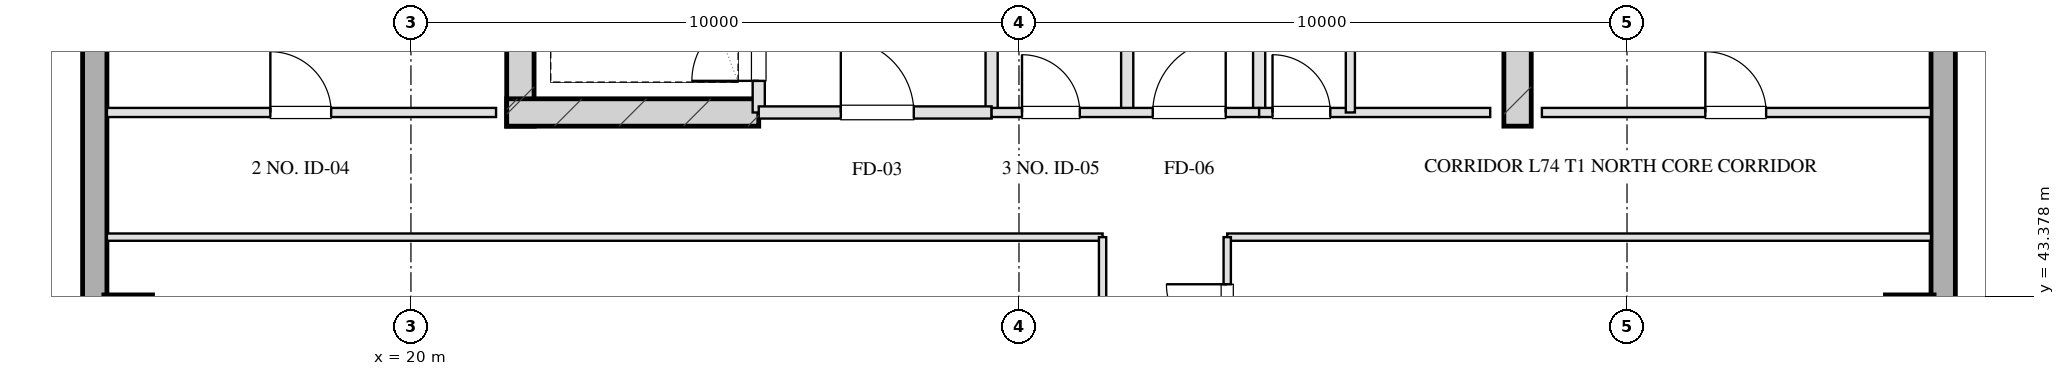
"""IFC4 building model, lengths in metres.
Left out: names, types, materials, properties, quantities, classifications, styles, units other than length and angle.
Written with IfcOpenShell. Run it as: python <this file> out.ifc"""

import sys

from ifc_helpers import new_model, si_unit, direction, frame, frame_2d, origin, origin_2d, place, context, subcontext, project, spatial, rectangle, hollow_rectangle, extrude, element, fill, save


model = new_model("IFC4")
c1 = context("Model", 3, precision=1e-05, world=origin(), true_north=direction((0.0, 1.0)))
c2 = subcontext(c1, "Body", "Model", "MODEL_VIEW")
j1 = project(units=[si_unit("LENGTHUNIT", "METRE"), si_unit("PLANEANGLEUNIT", "RADIAN")], contexts=[c1])
p1 = place(None, origin())
s1 = spatial("IfcSite", under=j1, at=p1, CompositionType="ELEMENT")
p2 = place(p1, origin())
s2 = spatial("IfcBuilding", under=s1, at=p2, CompositionType="ELEMENT")
p3 = place(p2, frame((0.0, 0.0, 269.6)))
s3 = spatial("IfcBuildingStorey", under=s2, at=p3, CompositionType="ELEMENT", Elevation=269.6)
for number, where, z_axis, x_axis in (
    (1, (21.8, 46.175, 0.0), (0.0, 0.0, 1.0), (0.0, 1.0, 0.0)),
    (2, (38.2, 46.175, 0.0), (0.0, 0.0, 1.0), (0.0, 1.0, 0.0)),
):
    element("IfcWall", number, at=place(p3, frame(where, z_axis=z_axis, x_axis=x_axis)), inside=s3, PredefinedType="SHEAR", context=c2, shape_type="SweptSolid", body=[
        extrude(rectangle(XDim=9.33, YDim=0.45, at=frame_2d((4.665, 0.0))), origin(), (0.0, 0.0, 1.0), 3.2),
    ])
p4 = place(p3, frame((21.575, 46.4, 0.0), z_axis=(0.0, 0.0, 1.0), x_axis=(1.0, 0.0, 0.0)))
e3 = element("IfcWall", 3, at=p4, inside=s3, PredefinedType="SHEAR", context=c2, shape_type="SweptSolid", body=[
    extrude(rectangle(XDim=4.145, YDim=0.45, at=frame_2d((2.073, 0.0))), origin(), (0.0, 0.0, 1.0), 3.2),
])
for number, where, z_axis, x_axis in (
    (4, (15.35, 43.0, 0.0), (0.0, 0.0, 1.0), (1.0, 0.0, 0.0)),
    (5, (44.65, 43.0, 0.0), (0.0, 0.0, 1.0), (1.0, 0.0, 0.0)),
):
    element("IfcColumn", number, at=place(p3, frame(where, z_axis=z_axis, x_axis=x_axis)), inside=s3, PredefinedType="COLUMN", context=c2, shape_type="SweptSolid", body=[
        extrude(hollow_rectangle(XDim=0.8, YDim=0.8, WallThickness=0.028, at=origin_2d()), origin(), (0.0, 0.0, 1.0), 3.201),
    ])
p5 = place(p3, frame((14.8, 13.1, 0.0), z_axis=(0.0, 0.0, 1.0), x_axis=(0.0, 1.0, 0.0)))
e6 = element("IfcWall", 6, at=p5, inside=s3, PredefinedType="SOLIDWALL", context=c2, shape_type="SweptSolid", body=[
    extrude(rectangle(XDim=41.8, YDim=0.4, at=frame_2d((20.9, 0.0))), origin(), (0.0, 0.0, 1.0), 2.36),
])
p6 = place(p5, frame((22.525, 0.0, 0.75)))
e7 = element("IfcOpeningElement", 7, at=p6, cuts=e6, PredefinedType="OPENING", context=c2, shape_type="SweptSolid", body=[
    extrude(rectangle(XDim=1.95, YDim=1.21, at=frame_2d((0.975, 0.605))), frame((0.0, 0.21, 0.0), z_axis=(0.0, -1.0, 0.0), x_axis=(1.0, 0.0, 0.0)), (0.0, 0.0, 1.0), 0.42),
])
p7 = place(p5, frame((26.325, 0.0, 0.75)))
e8 = element("IfcOpeningElement", 8, at=p7, cuts=e6, PredefinedType="OPENING", context=c2, shape_type="SweptSolid", body=[
    extrude(rectangle(XDim=1.95, YDim=1.21, at=frame_2d((0.975, 0.605))), frame((0.0, 0.21, 0.0), z_axis=(0.0, -1.0, 0.0), x_axis=(1.0, 0.0, 0.0)), (0.0, 0.0, 1.0), 0.42),
])
p8 = place(p5, frame((14.55, 0.0, 0.0)))
e9 = element("IfcOpeningElement", 9, at=p8, cuts=e6, PredefinedType="OPENING", context=c2, shape_type="SweptSolid", body=[
    extrude(rectangle(XDim=1.1, YDim=2.15, at=frame_2d((0.55, 1.075))), frame((0.0, 0.21, 0.0), z_axis=(0.0, -1.0, 0.0), x_axis=(1.0, 0.0, 0.0)), (0.0, 0.0, 1.0), 0.42),
])
p9 = place(p3, frame((45.2, 54.9, 0.0), z_axis=(0.0, 0.0, 1.0), x_axis=(0.0, -1.0, 0.0)))
e10 = element("IfcWall", 10, at=p9, inside=s3, PredefinedType="SOLIDWALL", context=c2, shape_type="SweptSolid", body=[
    extrude(rectangle(XDim=41.8, YDim=0.4, at=frame_2d((20.9, 0.0))), origin(), (0.0, 0.0, 1.0), 2.36),
])
p10 = place(p9, frame((17.325, 0.0, 0.75)))
e11 = element("IfcOpeningElement", 11, at=p10, cuts=e10, PredefinedType="OPENING", context=c2, shape_type="SweptSolid", body=[
    extrude(rectangle(XDim=1.95, YDim=1.21, at=frame_2d((0.975, 0.605))), frame((0.0, 0.21, 0.0), z_axis=(0.0, -1.0, 0.0), x_axis=(1.0, 0.0, 0.0)), (0.0, 0.0, 1.0), 0.42),
])
p11 = place(p9, frame((13.525, 0.0, 0.75)))
e12 = element("IfcOpeningElement", 12, at=p11, cuts=e10, PredefinedType="OPENING", context=c2, shape_type="SweptSolid", body=[
    extrude(rectangle(XDim=1.95, YDim=1.21, at=frame_2d((0.975, 0.605))), frame((0.0, 0.21, 0.0), z_axis=(0.0, -1.0, 0.0), x_axis=(1.0, 0.0, 0.0)), (0.0, 0.0, 1.0), 0.42),
])
p12 = place(p9, frame((23.45, 0.0, 0.0)))
e13 = element("IfcOpeningElement", 13, at=p12, cuts=e10, PredefinedType="OPENING", context=c2, shape_type="SweptSolid", body=[
    extrude(rectangle(XDim=1.1, YDim=2.15, at=frame_2d((0.55, 1.075))), frame((0.0, 0.21, 0.0), z_axis=(0.0, -1.0, 0.0), x_axis=(1.0, 0.0, 0.0)), (0.0, 0.0, 1.0), 0.42),
])
p13 = place(p3, frame((25.72, 46.4, 0.0), z_axis=(0.0, 0.0, 1.0), x_axis=(0.0, 1.0, 0.0)))
e14 = element("IfcWall", 14, at=p13, inside=s3, PredefinedType="PARTITIONING", context=c2, shape_type="SweptSolid", body=[
    extrude(rectangle(XDim=1.9, YDim=0.2, at=frame_2d((0.95, 0.0))), origin(), (0.0, 0.0, 1.0), 2.925),
])
p14 = place(p13, frame((0.52, 0.0, 0.0)))
e15 = element("IfcOpeningElement", 15, at=p14, cuts=e14, PredefinedType="OPENING", context=c2, shape_type="SweptSolid", body=[
    extrude(rectangle(XDim=1.1, YDim=2.05, at=frame_2d((0.55, 1.025))), frame((0.0, 0.11, 0.0), z_axis=(0.0, -1.0, 0.0), x_axis=(1.0, 0.0, 0.0)), (0.0, 0.0, 1.0), 0.22),
])
p15 = place(p3, frame((29.55, 46.4, 0.0), z_axis=(0.0, 0.0, 1.0), x_axis=(0.0, 1.0, 0.0)))
e16 = element("IfcWall", 16, at=p15, inside=s3, PredefinedType="PARTITIONING", context=c2, shape_type="SweptSolid", body=[
    extrude(rectangle(XDim=8.43, YDim=0.2, at=frame_2d((4.215, 0.0))), origin(), (0.0, 0.0, 1.0), 2.925),
])
p16 = place(p3, frame((25.72, 46.4, 0.0), z_axis=(0.0, 0.0, 1.0), x_axis=(1.0, 0.0, 0.0)))
e17 = element("IfcWall", 17, at=p16, inside=s3, PredefinedType="PARTITIONING", context=c2, shape_type="SweptSolid", body=[
    extrude(rectangle(XDim=3.83, YDim=0.2, at=frame_2d((1.915, 0.0))), origin(), (0.0, 0.0, 1.0), 2.925),
])
p17 = place(p16, frame((1.35, 0.0, 0.0)))
e18 = element("IfcOpeningElement", 18, at=p17, cuts=e17, PredefinedType="OPENING", context=c2, shape_type="SweptSolid", body=[
    extrude(rectangle(XDim=1.2, YDim=2.05, at=frame_2d((0.6, 1.025))), frame((0.0, 0.11, 0.0), z_axis=(0.0, -1.0, 0.0), x_axis=(1.0, 0.0, 0.0)), (0.0, 0.0, 1.0), 0.22),
])
for number, where, z_axis, x_axis in (
    (19, (33.95, 46.4, 0.0), (0.0, 0.0, 1.0), (0.0, 1.0, 0.0)),
    (20, (31.78, 46.4, 0.0), (0.0, 0.0, 1.0), (0.0, 1.0, 0.0)),
):
    element("IfcWall", number, at=place(p3, frame(where, z_axis=z_axis, x_axis=x_axis)), inside=s3, PredefinedType="PARTITIONING", context=c2, shape_type="SweptSolid", body=[
        extrude(rectangle(XDim=8.43, YDim=0.2, at=frame_2d((4.215, 0.0))), origin(), (0.0, 0.0, 1.0), 2.925),
    ])
p18 = place(p3, frame((29.55, 46.4, 0.0), z_axis=(0.0, 0.0, 1.0), x_axis=(1.0, 0.0, 0.0)))
e21 = element("IfcWall", 21, at=p18, inside=s3, PredefinedType="PARTITIONING", context=c2, shape_type="SweptSolid", body=[
    extrude(rectangle(XDim=4.4, YDim=0.15, at=frame_2d((2.2, 0.0))), origin(), (0.0, 0.0, 1.0), 2.925),
])
p19 = place(p18, frame((0.5, 0.0, 0.0)))
e22 = element("IfcOpeningElement", 22, at=p19, cuts=e21, PredefinedType="OPENING", context=c2, shape_type="SweptSolid", body=[
    extrude(rectangle(XDim=0.95, YDim=2.05, at=frame_2d((0.475, 1.025))), frame((0.0, 0.085, 0.0), z_axis=(0.0, -1.0, 0.0), x_axis=(1.0, 0.0, 0.0)), (0.0, 0.0, 1.0), 0.17),
])
p20 = place(p18, frame((2.65, 0.0, 0.0)))
e23 = element("IfcOpeningElement", 23, at=p20, cuts=e21, PredefinedType="OPENING", context=c2, shape_type="SweptSolid", body=[
    extrude(rectangle(XDim=1.2, YDim=2.05, at=frame_2d((0.6, 1.025))), frame((0.0, 0.085, 0.0), z_axis=(0.0, -1.0, 0.0), x_axis=(1.0, 0.0, 0.0)), (0.0, 0.0, 1.0), 0.17),
])
p21 = place(p3, frame((33.95, 46.4, 0.0), z_axis=(0.0, 0.0, 1.0), x_axis=(1.0, 0.0, 0.0)))
e24 = element("IfcWall", 24, at=p21, inside=s3, PredefinedType="PARTITIONING", context=c2, shape_type="SweptSolid", body=[
    extrude(rectangle(XDim=3.8, YDim=0.15, at=frame_2d((1.9, 0.0))), origin(), (0.0, 0.0, 1.0), 2.925),
])
p22 = place(p21, frame((0.22, 0.0, 0.0)))
e25 = element("IfcOpeningElement", 25, at=p22, cuts=e24, PredefinedType="OPENING", context=c2, shape_type="SweptSolid", body=[
    extrude(rectangle(XDim=0.95, YDim=2.05, at=frame_2d((0.475, 1.025))), frame((0.0, 0.085, 0.0), z_axis=(0.0, -1.0, 0.0), x_axis=(1.0, 0.0, 0.0)), (0.0, 0.0, 1.0), 0.17),
])
p23 = place(p3, frame((35.45, 46.4, 0.0), z_axis=(0.0, 0.0, 1.0), x_axis=(0.0, 1.0, 0.0)))
e26 = element("IfcWall", 26, at=p23, inside=s3, PredefinedType="PARTITIONING", context=c2, shape_type="SweptSolid", body=[
    extrude(rectangle(XDim=8.43, YDim=0.15, at=frame_2d((4.215, 0.0))), origin(), (0.0, 0.0, 1.0), 2.515),
])
p24 = place(p23, frame((2.55, 0.0, 0.0)))
e27 = element("IfcOpeningElement", 27, at=p24, cuts=e26, PredefinedType="OPENING", context=c2, shape_type="SweptSolid", body=[
    extrude(rectangle(XDim=0.95, YDim=2.05, at=frame_2d((0.475, 1.025))), frame((0.0, 0.085, 0.0), z_axis=(0.0, -1.0, 0.0), x_axis=(1.0, 0.0, 0.0)), (0.0, 0.0, 1.0), 0.17),
])
p25 = place(p23, frame((4.7, 0.0, 0.0)))
e28 = element("IfcOpeningElement", 28, at=p25, cuts=e26, PredefinedType="OPENING", context=c2, shape_type="SweptSolid", body=[
    extrude(rectangle(XDim=0.9, YDim=2.05, at=frame_2d((0.45, 1.025))), frame((0.0, 0.085, 0.0), z_axis=(0.0, -1.0, 0.0), x_axis=(1.0, 0.0, 0.0)), (0.0, 0.0, 1.0), 0.17),
])
p26 = place(p23, frame((6.8, 0.0, 0.0)))
e29 = element("IfcOpeningElement", 29, at=p26, cuts=e26, PredefinedType="OPENING", context=c2, shape_type="SweptSolid", body=[
    extrude(rectangle(XDim=0.9, YDim=2.05, at=frame_2d((0.45, 1.025))), frame((0.0, 0.085, 0.0), z_axis=(0.0, -1.0, 0.0), x_axis=(1.0, 0.0, 0.0)), (0.0, 0.0, 1.0), 0.17),
])
p27 = place(p3, frame((15.0, 46.4, 0.0), z_axis=(0.0, 0.0, 1.0), x_axis=(1.0, 0.0, 0.0)))
e30 = element("IfcWall", 30, at=p27, inside=s3, PredefinedType="PARTITIONING", context=c2, shape_type="SweptSolid", body=[
    extrude(rectangle(XDim=6.4, YDim=0.15, at=frame_2d((3.2, 0.0))), origin(), (0.0, 0.0, 1.0), 2.925),
])
p28 = place(p27, frame((2.688, 0.0, 0.0)))
e31 = element("IfcOpeningElement", 31, at=p28, cuts=e30, PredefinedType="OPENING", context=c2, shape_type="SweptSolid", body=[
    extrude(rectangle(XDim=1.0, YDim=2.05, at=frame_2d((0.5, 1.025))), frame((0.0, 0.085, 0.0), z_axis=(0.0, -1.0, 0.0), x_axis=(1.0, 0.0, 0.0)), (0.0, 0.0, 1.0), 0.17),
])
p29 = place(p3, frame((38.6, 46.4, 0.0), z_axis=(0.0, 0.0, 1.0), x_axis=(1.0, 0.0, 0.0)))
e32 = element("IfcWall", 32, at=p29, inside=s3, PredefinedType="PARTITIONING", context=c2, shape_type="SweptSolid", body=[
    extrude(rectangle(XDim=6.4, YDim=0.15, at=frame_2d((3.2, 0.0))), origin(), (0.0, 0.0, 1.0), 2.925),
])
p30 = place(p29, frame((2.688, 0.0, 0.0)))
e33 = element("IfcOpeningElement", 33, at=p30, cuts=e32, PredefinedType="OPENING", context=c2, shape_type="SweptSolid", body=[
    extrude(rectangle(XDim=1.0, YDim=2.05, at=frame_2d((0.5, 1.025))), frame((0.0, 0.085, 0.0), z_axis=(0.0, -1.0, 0.0), x_axis=(1.0, 0.0, 0.0)), (0.0, 0.0, 1.0), 0.17),
])
p31 = place(p3, frame((15.0, 44.35, 0.0), z_axis=(0.0, 0.0, 1.0), x_axis=(1.0, 0.0, 0.0)))
e34 = element("IfcWall", 34, at=p31, inside=s3, PredefinedType="PARTITIONING", context=c2, shape_type="SweptSolid", body=[
    extrude(rectangle(XDim=16.375, YDim=0.12, at=frame_2d((8.188, 0.0))), origin(), (0.0, 0.0, 1.0), 2.925),
])
p32 = place(p3, frame((33.425, 44.35, 0.0), z_axis=(0.0, 0.0, 1.0), x_axis=(1.0, 0.0, 0.0)))
e35 = element("IfcWall", 35, at=p32, inside=s3, PredefinedType="PARTITIONING", context=c2, shape_type="SweptSolid", body=[
    extrude(rectangle(XDim=11.575, YDim=0.12, at=frame_2d((5.788, 0.0))), origin(), (0.0, 0.0, 1.0), 2.925),
])
p33 = place(p3, frame((31.375, 23.65, 0.0), z_axis=(0.0, 0.0, 1.0), x_axis=(0.0, 1.0, 0.0)))
e36 = element("IfcWall", 36, at=p33, inside=s3, PredefinedType="PARTITIONING", context=c2, shape_type="SweptSolid", body=[
    extrude(rectangle(XDim=20.7, YDim=0.12, at=frame_2d((10.35, 0.0))), origin(), (0.0, 0.0, 1.0), 2.925),
])
p34 = place(p33, frame((2.675, 0.0, 0.0)))
e37 = element("IfcOpeningElement", 37, at=p34, cuts=e36, PredefinedType="OPENING", context=c2, shape_type="SweptSolid", body=[
    extrude(rectangle(XDim=1.0, YDim=2.05, at=frame_2d((0.5, 1.025))), frame((0.0, 0.07, 0.0), z_axis=(0.0, -1.0, 0.0), x_axis=(1.0, 0.0, 0.0)), (0.0, 0.0, 1.0), 0.14),
])
p35 = place(p33, frame((9.85, 0.0, 0.0)))
e38 = element("IfcOpeningElement", 38, at=p35, cuts=e36, PredefinedType="OPENING", context=c2, shape_type="SweptSolid", body=[
    extrude(rectangle(XDim=1.0, YDim=2.05, at=frame_2d((0.5, 1.025))), frame((0.0, 0.07, 0.0), z_axis=(0.0, -1.0, 0.0), x_axis=(1.0, 0.0, 0.0)), (0.0, 0.0, 1.0), 0.14),
])
p36 = place(p33, frame((17.025, 0.0, 0.0)))
e39 = element("IfcOpeningElement", 39, at=p36, cuts=e36, PredefinedType="OPENING", context=c2, shape_type="SweptSolid", body=[
    extrude(rectangle(XDim=1.0, YDim=2.05, at=frame_2d((0.5, 1.025))), frame((0.0, 0.07, 0.0), z_axis=(0.0, -1.0, 0.0), x_axis=(1.0, 0.0, 0.0)), (0.0, 0.0, 1.0), 0.14),
])
p37 = place(p3, frame((33.425, 23.65, 0.0), z_axis=(0.0, 0.0, 1.0), x_axis=(0.0, 1.0, 0.0)))
e40 = element("IfcWall", 40, at=p37, inside=s3, PredefinedType="PARTITIONING", context=c2, shape_type="SweptSolid", body=[
    extrude(rectangle(XDim=20.7, YDim=0.12, at=frame_2d((10.35, 0.0))), origin(), (0.0, 0.0, 1.0), 2.925),
])
p38 = place(p37, frame((2.175, 0.0, 0.0)))
e41 = element("IfcOpeningElement", 41, at=p38, cuts=e40, PredefinedType="OPENING", context=c2, shape_type="SweptSolid", body=[
    extrude(rectangle(XDim=1.0, YDim=2.05, at=frame_2d((0.5, 1.025))), frame((0.0, 0.07, 0.0), z_axis=(0.0, -1.0, 0.0), x_axis=(1.0, 0.0, 0.0)), (0.0, 0.0, 1.0), 0.14),
])
p39 = place(p37, frame((6.75, 0.0, 0.0)))
e42 = element("IfcOpeningElement", 42, at=p39, cuts=e40, PredefinedType="OPENING", context=c2, shape_type="SweptSolid", body=[
    extrude(rectangle(XDim=1.05, YDim=2.05, at=frame_2d((0.525, 1.025))), frame((0.0, 0.07, 0.0), z_axis=(0.0, -1.0, 0.0), x_axis=(1.0, 0.0, 0.0)), (0.0, 0.0, 1.0), 0.14),
])
p40 = place(p37, frame((11.25, 0.0, 0.0)))
e43 = element("IfcOpeningElement", 43, at=p40, cuts=e40, PredefinedType="OPENING", context=c2, shape_type="SweptSolid", body=[
    extrude(rectangle(XDim=1.0, YDim=2.05, at=frame_2d((0.5, 1.025))), frame((0.0, 0.07, 0.0), z_axis=(0.0, -1.0, 0.0), x_axis=(1.0, 0.0, 0.0)), (0.0, 0.0, 1.0), 0.14),
])
p41 = place(p37, frame((15.75, 0.0, 0.0)))
e44 = element("IfcOpeningElement", 44, at=p41, cuts=e40, PredefinedType="OPENING", context=c2, shape_type="SweptSolid", body=[
    extrude(rectangle(XDim=1.0, YDim=2.05, at=frame_2d((0.5, 1.025))), frame((0.0, 0.07, 0.0), z_axis=(0.0, -1.0, 0.0), x_axis=(1.0, 0.0, 0.0)), (0.0, 0.0, 1.0), 0.14),
])
p42 = place(p37, frame((18.925, 0.0, 0.0)))
e45 = element("IfcOpeningElement", 45, at=p42, cuts=e40, PredefinedType="OPENING", context=c2, shape_type="SweptSolid", body=[
    extrude(rectangle(XDim=1.0, YDim=2.05, at=frame_2d((0.5, 1.025))), frame((0.0, 0.07, 0.0), z_axis=(0.0, -1.0, 0.0), x_axis=(1.0, 0.0, 0.0)), (0.0, 0.0, 1.0), 0.14),
])
p43 = place(p14, origin())
e46 = element("IfcDoor", 46, at=p43, inside=s3, OperationType="SINGLE_SWING_LEFT", PredefinedType="DOOR", context=c2, shape_type="SweptSolid", body=[
    extrude(rectangle(XDim=1.1, YDim=2.05, at=frame_2d((0.55, 1.025))), frame((0.0, 0.025, 0.0), z_axis=(0.0, -1.0, 0.0), x_axis=(1.0, 0.0, 0.0)), (0.0, 0.0, 1.0), 0.05),
])
fill(e15, e46)
p44 = place(p17, origin())
e47 = element("IfcDoor", 47, at=p44, inside=s3, OperationType="SINGLE_SWING_LEFT", PredefinedType="DOOR", context=c2, shape_type="SweptSolid", body=[
    extrude(rectangle(XDim=1.2, YDim=2.05, at=frame_2d((0.6, 1.025))), frame((0.0, 0.025, 0.0), z_axis=(0.0, -1.0, 0.0), x_axis=(1.0, 0.0, 0.0)), (0.0, 0.0, 1.0), 0.05),
])
fill(e18, e47)
p45 = place(p19, origin())
e48 = element("IfcDoor", 48, at=p45, inside=s3, OperationType="SINGLE_SWING_LEFT", PredefinedType="DOOR", context=c2, shape_type="SweptSolid", body=[
    extrude(rectangle(XDim=0.95, YDim=2.05, at=frame_2d((0.475, 1.025))), frame((0.0, 0.025, 0.0), z_axis=(0.0, -1.0, 0.0), x_axis=(1.0, 0.0, 0.0)), (0.0, 0.0, 1.0), 0.05),
])
fill(e22, e48)
p46 = place(p20, origin())
e49 = element("IfcDoor", 49, at=p46, inside=s3, OperationType="SINGLE_SWING_RIGHT", PredefinedType="DOOR", context=c2, shape_type="SweptSolid", body=[
    extrude(rectangle(XDim=1.2, YDim=2.05, at=frame_2d((0.6, 1.025))), frame((0.0, 0.025, 0.0), z_axis=(0.0, -1.0, 0.0), x_axis=(1.0, 0.0, 0.0)), (0.0, 0.0, 1.0), 0.05),
])
fill(e23, e49)
p47 = place(p22, origin())
e50 = element("IfcDoor", 50, at=p47, inside=s3, OperationType="SINGLE_SWING_LEFT", PredefinedType="DOOR", context=c2, shape_type="SweptSolid", body=[
    extrude(rectangle(XDim=0.95, YDim=2.05, at=frame_2d((0.475, 1.025))), frame((0.0, 0.025, 0.0), z_axis=(0.0, -1.0, 0.0), x_axis=(1.0, 0.0, 0.0)), (0.0, 0.0, 1.0), 0.05),
])
fill(e25, e50)
p48 = place(p28, origin())
e51 = element("IfcDoor", 51, at=p48, inside=s3, OperationType="SINGLE_SWING_LEFT", PredefinedType="DOOR", context=c2, shape_type="SweptSolid", body=[
    extrude(rectangle(XDim=1.0, YDim=2.05, at=frame_2d((0.5, 1.025))), frame((0.0, 0.025, 0.0), z_axis=(0.0, -1.0, 0.0), x_axis=(1.0, 0.0, 0.0)), (0.0, 0.0, 1.0), 0.05),
])
fill(e31, e51)
p49 = place(p30, origin())
e52 = element("IfcDoor", 52, at=p49, inside=s3, OperationType="SINGLE_SWING_LEFT", PredefinedType="DOOR", context=c2, shape_type="SweptSolid", body=[
    extrude(rectangle(XDim=1.0, YDim=2.05, at=frame_2d((0.5, 1.025))), frame((0.0, 0.025, 0.0), z_axis=(0.0, -1.0, 0.0), x_axis=(1.0, 0.0, 0.0)), (0.0, 0.0, 1.0), 0.05),
])
fill(e33, e52)
p50 = place(p42, origin())
e53 = element("IfcDoor", 53, at=p50, inside=s3, OperationType="SINGLE_SWING_RIGHT", PredefinedType="DOOR", context=c2, shape_type="SweptSolid", body=[
    extrude(rectangle(XDim=1.0, YDim=2.05, at=frame_2d((0.5, 1.025))), frame((0.0, 0.025, 0.0), z_axis=(0.0, -1.0, 0.0), x_axis=(1.0, 0.0, 0.0)), (0.0, 0.0, 1.0), 0.05),
])
fill(e45, e53)
save(model, sys.argv[1])
